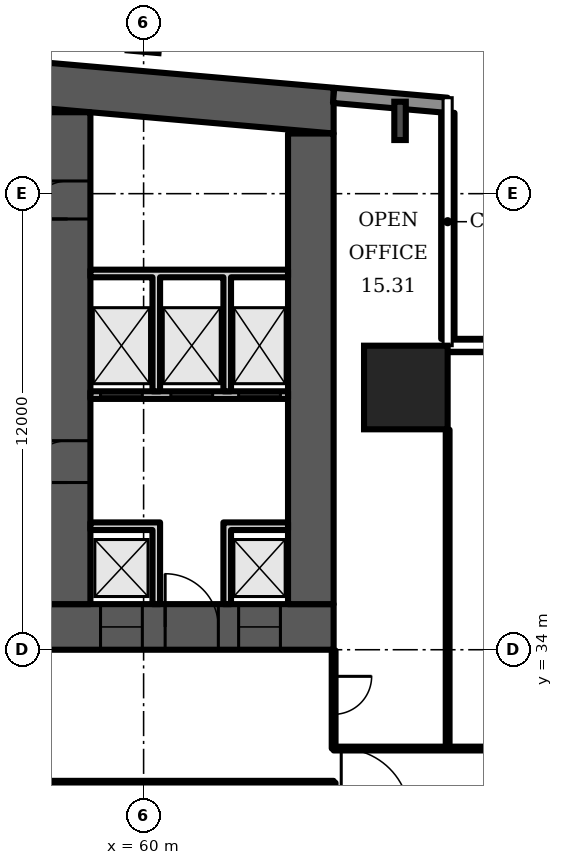
"""IFC4 building model, lengths in metres.
Left out: names, types, materials, properties, quantities, classifications, styles, units other than length and angle.
Written with IfcOpenShell. Run it as: python <this file> out.ifc"""

import sys

from ifc_helpers import new_model, si_unit, direction, frame, frame_2d, origin, origin_2d, place, context, subcontext, project, spatial, polyline, rectangle, i_section, outline, extrude, element, fill, save


model = new_model("IFC4")
c1 = context("Model", 3, precision=1e-05, world=origin(), true_north=direction((0.0, 1.0)))
c2 = subcontext(c1, "Body", "Model", "MODEL_VIEW")
j1 = project(units=[si_unit("LENGTHUNIT", "METRE"), si_unit("PLANEANGLEUNIT", "RADIAN")], contexts=[c1])
p1 = place(None, origin())
s1 = spatial("IfcSite", under=j1, at=p1, CompositionType="ELEMENT")
p2 = place(p1, origin())
s2 = spatial("IfcBuilding", under=s1, at=p2, CompositionType="ELEMENT")
p3 = place(p2, frame((0.0, 0.0, 73.9)))
s3 = spatial("IfcBuildingStorey", under=s2, at=p3, CompositionType="ELEMENT", Elevation=73.9)
p4 = place(p3, origin())
e1 = element("IfcWall", 1, at=p4, inside=s3, PredefinedType="SHEAR", context=c2, shape_type="SweptSolid", body=[
    extrude(outline(polyline([(9.0, 47.583), (37.0, 50.032), (65.0, 47.583), (65.0, 48.787), (37.0, 51.237), (9.0, 48.787), (9.0, 47.583)])), origin(), (0.0, 0.0, 1.0), 3.6),
])
p5 = place(p3, frame((9.0, 34.6, 0.0), z_axis=(0.0, 0.0, 1.0), x_axis=(1.0, 0.0, 0.0)))
e2 = element("IfcWall", 2, at=p5, inside=s3, PredefinedType="SHEAR", context=c2, shape_type="SweptSolid", body=[
    extrude(rectangle(XDim=56.0, YDim=1.2, at=frame_2d((28.0, 0.0))), origin(), (0.0, 0.0, 1.0), 3.6),
])
p6 = place(p5, frame((2.0, 0.0, 0.0)))
e3 = element("IfcOpeningElement", 3, at=p6, cuts=e2, PredefinedType="OPENING", context=c2, shape_type="SweptSolid", body=[
    extrude(rectangle(XDim=1.0, YDim=2.1, at=frame_2d((0.5, 1.05))), frame((0.0, 0.61, 0.0), z_axis=(0.0, -1.0, 0.0), x_axis=(1.0, 0.0, 0.0)), (0.0, 0.0, 1.0), 1.22),
])
p7 = place(p5, frame((4.6, 0.0, 0.0)))
e4 = element("IfcOpeningElement", 4, at=p7, cuts=e2, PredefinedType="OPENING", context=c2, shape_type="SweptSolid", body=[
    extrude(rectangle(XDim=1.0, YDim=2.1, at=frame_2d((0.5, 1.05))), frame((0.0, 0.61, 0.0), z_axis=(0.0, -1.0, 0.0), x_axis=(1.0, 0.0, 0.0)), (0.0, 0.0, 1.0), 1.22),
])
p8 = place(p5, frame((7.867, 0.0, 0.0)))
e5 = element("IfcOpeningElement", 5, at=p8, cuts=e2, PredefinedType="OPENING", context=c2, shape_type="SweptSolid", body=[
    extrude(rectangle(XDim=1.1, YDim=2.1, at=frame_2d((0.55, 1.05))), frame((0.0, 0.61, 0.0), z_axis=(0.0, -1.0, 0.0), x_axis=(1.0, 0.0, 0.0)), (0.0, 0.0, 1.0), 1.22),
])
p9 = place(p5, frame((12.033, 0.0, 0.0)))
e6 = element("IfcOpeningElement", 6, at=p9, cuts=e2, PredefinedType="OPENING", context=c2, shape_type="SweptSolid", body=[
    extrude(rectangle(XDim=1.1, YDim=2.1, at=frame_2d((0.55, 1.05))), frame((0.0, 0.61, 0.0), z_axis=(0.0, -1.0, 0.0), x_axis=(1.0, 0.0, 0.0)), (0.0, 0.0, 1.0), 1.22),
])
p10 = place(p5, frame((9.8, 0.0, 0.0)))
e7 = element("IfcOpeningElement", 7, at=p10, cuts=e2, PredefinedType="OPENING", context=c2, shape_type="SweptSolid", body=[
    extrude(rectangle(XDim=1.4, YDim=2.1, at=frame_2d((0.7, 1.05))), frame((0.0, 0.61, 0.0), z_axis=(0.0, -1.0, 0.0), x_axis=(1.0, 0.0, 0.0)), (0.0, 0.0, 1.0), 1.22),
])
p11 = place(p5, frame((14.65, 0.0, 0.0)))
e8 = element("IfcOpeningElement", 8, at=p11, cuts=e2, PredefinedType="OPENING", context=c2, shape_type="SweptSolid", body=[
    extrude(rectangle(XDim=1.2, YDim=2.1, at=frame_2d((0.6, 1.05))), frame((0.0, 0.61, 0.0), z_axis=(0.0, -1.0, 0.0), x_axis=(1.0, 0.0, 0.0)), (0.0, 0.0, 1.0), 1.22),
])
p12 = place(p5, frame((21.867, 0.0, 0.0)))
e9 = element("IfcOpeningElement", 9, at=p12, cuts=e2, PredefinedType="OPENING", context=c2, shape_type="SweptSolid", body=[
    extrude(rectangle(XDim=1.1, YDim=2.1, at=frame_2d((0.55, 1.05))), frame((0.0, 0.61, 0.0), z_axis=(0.0, -1.0, 0.0), x_axis=(1.0, 0.0, 0.0)), (0.0, 0.0, 1.0), 1.22),
])
p13 = place(p5, frame((26.033, 0.0, 0.0)))
e10 = element("IfcOpeningElement", 10, at=p13, cuts=e2, PredefinedType="OPENING", context=c2, shape_type="SweptSolid", body=[
    extrude(rectangle(XDim=1.1, YDim=2.1, at=frame_2d((0.55, 1.05))), frame((0.0, 0.61, 0.0), z_axis=(0.0, -1.0, 0.0), x_axis=(1.0, 0.0, 0.0)), (0.0, 0.0, 1.0), 1.22),
])
p14 = place(p5, frame((23.8, 0.0, 0.0)))
e11 = element("IfcOpeningElement", 11, at=p14, cuts=e2, PredefinedType="OPENING", context=c2, shape_type="SweptSolid", body=[
    extrude(rectangle(XDim=1.4, YDim=2.1, at=frame_2d((0.7, 1.05))), frame((0.0, 0.61, 0.0), z_axis=(0.0, -1.0, 0.0), x_axis=(1.0, 0.0, 0.0)), (0.0, 0.0, 1.0), 1.22),
])
p15 = place(p5, frame((28.867, 0.0, 0.0)))
e12 = element("IfcOpeningElement", 12, at=p15, cuts=e2, PredefinedType="OPENING", context=c2, shape_type="SweptSolid", body=[
    extrude(rectangle(XDim=1.1, YDim=2.1, at=frame_2d((0.55, 1.05))), frame((0.0, 0.61, 0.0), z_axis=(0.0, -1.0, 0.0), x_axis=(1.0, 0.0, 0.0)), (0.0, 0.0, 1.0), 1.22),
])
p16 = place(p5, frame((33.033, 0.0, 0.0)))
e13 = element("IfcOpeningElement", 13, at=p16, cuts=e2, PredefinedType="OPENING", context=c2, shape_type="SweptSolid", body=[
    extrude(rectangle(XDim=1.1, YDim=2.1, at=frame_2d((0.55, 1.05))), frame((0.0, 0.61, 0.0), z_axis=(0.0, -1.0, 0.0), x_axis=(1.0, 0.0, 0.0)), (0.0, 0.0, 1.0), 1.22),
])
p17 = place(p5, frame((40.15, 0.0, 0.0)))
e14 = element("IfcOpeningElement", 14, at=p17, cuts=e2, PredefinedType="OPENING", context=c2, shape_type="SweptSolid", body=[
    extrude(rectangle(XDim=1.2, YDim=2.1, at=frame_2d((0.6, 1.05))), frame((0.0, 0.61, 0.0), z_axis=(0.0, -1.0, 0.0), x_axis=(1.0, 0.0, 0.0)), (0.0, 0.0, 1.0), 1.22),
])
p18 = place(p5, frame((44.8, 0.0, 0.0)))
e15 = element("IfcOpeningElement", 15, at=p18, cuts=e2, PredefinedType="OPENING", context=c2, shape_type="SweptSolid", body=[
    extrude(rectangle(XDim=1.4, YDim=2.1, at=frame_2d((0.7, 1.05))), frame((0.0, 0.61, 0.0), z_axis=(0.0, -1.0, 0.0), x_axis=(1.0, 0.0, 0.0)), (0.0, 0.0, 1.0), 1.22),
])
p19 = place(p5, frame((49.867, 0.0, 0.0)))
e16 = element("IfcOpeningElement", 16, at=p19, cuts=e2, PredefinedType="OPENING", context=c2, shape_type="SweptSolid", body=[
    extrude(rectangle(XDim=1.1, YDim=2.1, at=frame_2d((0.55, 1.05))), frame((0.0, 0.61, 0.0), z_axis=(0.0, -1.0, 0.0), x_axis=(1.0, 0.0, 0.0)), (0.0, 0.0, 1.0), 1.22),
])
p20 = place(p5, frame((53.5, 0.0, 0.0)))
e17 = element("IfcOpeningElement", 17, at=p20, cuts=e2, PredefinedType="OPENING", context=c2, shape_type="SweptSolid", body=[
    extrude(rectangle(XDim=1.1, YDim=2.1, at=frame_2d((0.55, 1.05))), frame((0.0, 0.61, 0.0), z_axis=(0.0, -1.0, 0.0), x_axis=(1.0, 0.0, 0.0)), (0.0, 0.0, 1.0), 1.22),
])
p21 = place(p5, frame((51.567, 0.0, 0.0)))
e18 = element("IfcOpeningElement", 18, at=p21, cuts=e2, PredefinedType="OPENING", context=c2, shape_type="SweptSolid", body=[
    extrude(rectangle(XDim=1.4, YDim=2.1, at=frame_2d((0.7, 1.05))), frame((0.0, 0.61, 0.0), z_axis=(0.0, -1.0, 0.0), x_axis=(1.0, 0.0, 0.0)), (0.0, 0.0, 1.0), 1.22),
])
p22 = place(p3, frame((58.0, 35.2, 0.0), z_axis=(0.0, 0.0, 1.0), x_axis=(0.0, 1.0, 0.0)))
e19 = element("IfcWall", 19, at=p22, inside=s3, PredefinedType="SHEAR", context=c2, shape_type="SweptSolid", body=[
    extrude(rectangle(XDim=12.943, YDim=1.2, at=frame_2d((6.471, 0.0))), origin(), (0.0, 0.0, 1.0), 3.6),
])
p23 = place(p22, frame((10.134, 0.0, 0.0)))
e20 = element("IfcOpeningElement", 20, at=p23, cuts=e19, PredefinedType="OPENING", context=c2, shape_type="SweptSolid", body=[
    extrude(rectangle(XDim=1.0, YDim=2.1, at=frame_2d((0.5, 1.05))), frame((0.0, 0.61, 0.0), z_axis=(0.0, -1.0, 0.0), x_axis=(1.0, 0.0, 0.0)), (0.0, 0.0, 1.0), 1.22),
])
p24 = place(p22, frame((3.2, 0.0, 0.0)))
e21 = element("IfcOpeningElement", 21, at=p24, cuts=e19, PredefinedType="OPENING", context=c2, shape_type="SweptSolid", body=[
    extrude(rectangle(XDim=1.1, YDim=2.1, at=frame_2d((0.55, 1.05))), frame((0.0, 0.61, 0.0), z_axis=(0.0, -1.0, 0.0), x_axis=(1.0, 0.0, 0.0)), (0.0, 0.0, 1.0), 1.22),
])
p25 = place(p3, frame((64.4, 35.2, 0.0), z_axis=(0.0, 0.0, 1.0), x_axis=(0.0, 1.0, 0.0)))
e22 = element("IfcWall", 22, at=p25, inside=s3, PredefinedType="SHEAR", context=c2, shape_type="SweptSolid", body=[
    extrude(rectangle(XDim=12.383, YDim=1.2, at=frame_2d((6.191, 0.0))), origin(), (0.0, 0.0, 1.0), 3.6),
])
p26 = place(p3, frame((66.9, 40.9, 0.0), z_axis=(0.0, 0.0, 1.0), x_axis=(1.0, 0.0, 0.0)))
e23 = element("IfcColumn", 23, at=p26, inside=s3, PredefinedType="COLUMN", context=c2, shape_type="SweptSolid", body=[
    extrude(rectangle(XDim=2.2, YDim=2.2, at=origin_2d()), origin(), (0.0, 0.0, 1.0), 3.6),
])
p27 = place(p3, frame((66.748, 47.915, 0.0), z_axis=(0.0, 0.0, 1.0), x_axis=(1.0, 0.0, 0.0)))
e24 = element("IfcColumn", 24, at=p27, inside=s3, PredefinedType="COLUMN", context=c2, shape_type="SweptSolid", body=[
    extrude(i_section(OverallWidth=0.302, OverallDepth=1.008, WebThickness=0.021, FlangeThickness=0.04, FilletRadius=0.03, at=origin_2d()), origin(), (0.0, 0.0, 1.0), 3.6),
])
p28 = place(p3, frame((60.0, 49.885, 0.0), z_axis=(0.0, 0.0, 1.0), x_axis=(0.087156, 0.996197, 0.0)))
e25 = element("IfcColumn", 25, at=p28, inside=s3, PredefinedType="COLUMN", context=c2, shape_type="SweptSolid", body=[
    extrude(i_section(OverallWidth=0.303, OverallDepth=0.814, WebThickness=0.021, FlangeThickness=0.04, FilletRadius=0.03, at=origin_2d()), origin(), (0.0, 0.0, 1.0), 3.6),
])
p29 = place(p3, frame((67.983, 48.326, 0.0), z_axis=(0.0, 0.0, 1.0), x_axis=(-0.996194, 0.087168, 0.0)))
e26 = element("IfcWall", 26, at=p29, inside=s3, PredefinedType="SOLIDWALL", context=c2, shape_type="SweptSolid", body=[
    extrude(rectangle(XDim=2.994, YDim=0.4, at=frame_2d((1.497, 0.0))), origin(), (0.0, 0.0, 1.0), 3.2),
])
p30 = place(p3, frame((76.047, 42.005, 0.0), z_axis=(0.0, 0.0, 1.0), x_axis=(-1.0, 0.0, 0.0)))
e27 = element("IfcWall", 27, at=p30, inside=s3, PredefinedType="SOLIDWALL", context=c2, shape_type="SweptSolid", body=[
    extrude(rectangle(XDim=8.047, YDim=0.35, at=frame_2d((4.023, 0.0))), origin(), (0.0, 0.0, 1.0), 1.0),
])
p31 = place(p3, frame((68.005, 42.18, 0.0), z_axis=(0.0, 0.0, 1.0), x_axis=(0.0, 1.0, 0.0)))
e28 = element("IfcWall", 28, at=p31, inside=s3, PredefinedType="SOLIDWALL", context=c2, shape_type="SweptSolid", body=[
    extrude(rectangle(XDim=5.947, YDim=0.35, at=frame_2d((2.973, 0.0))), origin(), (0.0, 0.0, 1.0), 1.0),
])
p32 = place(p3, frame((58.6, 40.7, 0.0), z_axis=(0.0, 0.0, 1.0), x_axis=(1.0, 0.0, 0.0)))
e29 = element("IfcWall", 29, at=p32, inside=s3, PredefinedType="PARTITIONING", context=c2, shape_type="SweptSolid", body=[
    extrude(rectangle(XDim=5.2, YDim=0.2, at=frame_2d((2.6, 0.0))), origin(), (0.0, 0.0, 1.0), 3.2),
])
p33 = place(p32, frame((0.267, 0.0, 0.0)))
e30 = element("IfcOpeningElement", 30, at=p33, cuts=e29, PredefinedType="OPENING", context=c2, shape_type="SweptSolid", body=[
    extrude(rectangle(XDim=1.1, YDim=2.1, at=frame_2d((0.55, 1.05))), frame((0.0, 0.11, 0.0), z_axis=(0.0, -1.0, 0.0), x_axis=(1.0, 0.0, 0.0)), (0.0, 0.0, 1.0), 0.22),
])
p34 = place(p32, frame((2.117, 0.0, 0.0)))
e31 = element("IfcOpeningElement", 31, at=p34, cuts=e29, PredefinedType="OPENING", context=c2, shape_type="SweptSolid", body=[
    extrude(rectangle(XDim=1.1, YDim=2.1, at=frame_2d((0.55, 1.05))), frame((0.0, 0.11, 0.0), z_axis=(0.0, -1.0, 0.0), x_axis=(1.0, 0.0, 0.0)), (0.0, 0.0, 1.0), 0.22),
])
p35 = place(p32, frame((3.9, 0.0, 0.0)))
e32 = element("IfcOpeningElement", 32, at=p35, cuts=e29, PredefinedType="OPENING", context=c2, shape_type="SweptSolid", body=[
    extrude(rectangle(XDim=1.1, YDim=2.1, at=frame_2d((0.55, 1.05))), frame((0.0, 0.11, 0.0), z_axis=(0.0, -1.0, 0.0), x_axis=(1.0, 0.0, 0.0)), (0.0, 0.0, 1.0), 0.22),
])
p36 = place(p3, origin())
e33 = element("IfcWall", 33, at=p36, inside=s3, PredefinedType="PARTITIONING", context=c2, shape_type="SweptSolid", body=[
    extrude(outline(polyline([(60.233, 37.15), (58.6, 37.15), (58.6, 37.35), (60.233, 37.35), (60.433, 37.35), (60.433, 35.2), (60.233, 35.2), (60.233, 37.15)])), origin(), (0.0, 0.0, 1.0), 3.2),
])
p37 = place(p3, origin())
e34 = element("IfcWall", 34, at=p37, inside=s3, PredefinedType="PARTITIONING", context=c2, shape_type="SweptSolid", body=[
    extrude(outline(polyline([(62.1, 37.35), (62.3, 37.35), (63.8, 37.35), (63.8, 37.15), (62.3, 37.15), (62.3, 35.2), (62.1, 35.2), (62.1, 37.35)])), origin(), (0.0, 0.0, 1.0), 3.2),
])
p38 = place(p3, origin())
e35 = element("IfcWall", 35, at=p38, inside=s3, PredefinedType="PARTITIONING", context=c2, shape_type="SweptSolid", body=[
    extrude(outline(polyline([(60.433, 40.8), (60.233, 40.8), (60.233, 43.8), (58.6, 43.8), (58.6, 44.0), (63.8, 44.0), (63.8, 43.8), (62.3, 43.8), (62.3, 40.8), (62.1, 40.8), (62.1, 43.8), (60.433, 43.8), (60.433, 40.8)])), origin(), (0.0, 0.0, 1.0), 3.2),
])
p39 = place(p3, frame((45.3, 30.5, 0.0), z_axis=(0.0, 0.0, 1.0), x_axis=(1.0, 0.0, 0.0)))
e36 = element("IfcWall", 36, at=p39, inside=s3, PredefinedType="PARTITIONING", context=c2, shape_type="SweptSolid", body=[
    extrude(rectangle(XDim=19.7, YDim=0.1, at=frame_2d((9.85, 0.0))), origin(), (0.0, 0.0, 1.0), 3.2),
])
p40 = place(p3, frame((57.67, 13.24, 0.0), z_axis=(0.0, 0.0, 1.0), x_axis=(0.0, 1.0, 0.0)))
e37 = element("IfcWall", 37, at=p40, inside=s3, PredefinedType="PARTITIONING", context=c2, shape_type="SweptSolid", body=[
    extrude(rectangle(XDim=17.26, YDim=0.1, at=frame_2d((8.63, 0.0))), origin(), (0.0, 0.0, 1.0), 3.2),
])
p41 = place(p3, frame((65.0, 29.6, 0.0), z_axis=(0.0, 0.0, 1.0), x_axis=(0.0, 1.0, 0.0)))
e38 = element("IfcWall", 38, at=p41, inside=s3, PredefinedType="PARTITIONING", context=c2, shape_type="SweptSolid", body=[
    extrude(rectangle(XDim=0.9, YDim=0.1, at=frame_2d((0.45, 0.0))), origin(), (0.0, 0.0, 1.0), 3.2),
])
p42 = place(p3, frame((65.0, 31.4, 0.0), z_axis=(0.0, 0.0, 1.0), x_axis=(0.0, 1.0, 0.0)))
e39 = element("IfcWall", 39, at=p42, inside=s3, PredefinedType="PARTITIONING", context=c2, shape_type="SweptSolid", body=[
    extrude(rectangle(XDim=2.58, YDim=0.1, at=frame_2d((1.29, 0.0))), origin(), (0.0, 0.0, 1.0), 3.2),
])
p43 = place(p42, frame((0.9, 0.0, 0.0)))
e40 = element("IfcOpeningElement", 40, at=p43, cuts=e39, PredefinedType="OPENING", context=c2, shape_type="SweptSolid", body=[
    extrude(rectangle(XDim=1.0, YDim=2.1, at=frame_2d((0.5, 1.05))), frame((0.0, 0.06, 0.0), z_axis=(0.0, -1.0, 0.0), x_axis=(1.0, 0.0, 0.0)), (0.0, 0.0, 1.0), 0.12),
])
p44 = place(p3, frame((65.0, 31.4, 0.0), z_axis=(0.0, 0.0, 1.0), x_axis=(1.0, 0.0, 0.0)))
e41 = element("IfcWall", 41, at=p44, inside=s3, PredefinedType="PARTITIONING", context=c2, shape_type="SweptSolid", body=[
    extrude(rectangle(XDim=7.81, YDim=0.1, at=frame_2d((3.905, 0.0))), origin(), (0.0, 0.0, 1.0), 3.2),
])
p45 = place(p44, frame((6.657, 0.0, 0.0)))
e42 = element("IfcOpeningElement", 42, at=p45, cuts=e41, PredefinedType="OPENING", context=c2, shape_type="SweptSolid", body=[
    extrude(rectangle(XDim=1.0, YDim=2.1, at=frame_2d((0.5, 1.05))), frame((0.0, 0.06, 0.0), z_axis=(0.0, -1.0, 0.0), x_axis=(1.0, 0.0, 0.0)), (0.0, 0.0, 1.0), 0.12),
])
p46 = place(p3, frame((68.0, 31.4, 0.0), z_axis=(0.0, 0.0, 1.0), x_axis=(0.0, 1.0, 0.0)))
e43 = element("IfcWall", 43, at=p46, inside=s3, PredefinedType="PARTITIONING", context=c2, shape_type="SweptSolid", body=[
    extrude(rectangle(XDim=8.39, YDim=0.1, at=frame_2d((4.195, 0.0))), origin(), (0.0, 0.0, 1.0), 3.2),
])
p47 = place(p19, origin())
e44 = element("IfcDoor", 44, at=p47, inside=s3, OperationType="DOUBLE_DOOR_SLIDING", PredefinedType="DOOR", context=c2, shape_type="SweptSolid", body=[
    extrude(rectangle(XDim=1.1, YDim=2.1, at=frame_2d((0.55, 1.05))), frame((0.0, 0.025, 0.0), z_axis=(0.0, -1.0, 0.0), x_axis=(1.0, 0.0, 0.0)), (0.0, 0.0, 1.0), 0.05),
])
fill(e16, e44)
p48 = place(p20, origin())
e45 = element("IfcDoor", 45, at=p48, inside=s3, OperationType="DOUBLE_DOOR_SLIDING", PredefinedType="DOOR", context=c2, shape_type="SweptSolid", body=[
    extrude(rectangle(XDim=1.1, YDim=2.1, at=frame_2d((0.55, 1.05))), frame((0.0, 0.025, 0.0), z_axis=(0.0, -1.0, 0.0), x_axis=(1.0, 0.0, 0.0)), (0.0, 0.0, 1.0), 0.05),
])
fill(e17, e45)
p49 = place(p21, origin())
e46 = element("IfcDoor", 46, at=p49, inside=s3, OperationType="DOUBLE_DOOR_SINGLE_SWING", PredefinedType="DOOR", context=c2, shape_type="SweptSolid", body=[
    extrude(rectangle(XDim=1.4, YDim=2.1, at=frame_2d((0.7, 1.05))), frame((0.0, 0.025, 0.0), z_axis=(0.0, -1.0, 0.0), x_axis=(1.0, 0.0, 0.0)), (0.0, 0.0, 1.0), 0.05),
])
fill(e18, e46)
p50 = place(p33, origin())
e47 = element("IfcDoor", 47, at=p50, inside=s3, OperationType="DOUBLE_DOOR_SLIDING", PredefinedType="DOOR", context=c2, shape_type="SweptSolid", body=[
    extrude(rectangle(XDim=1.1, YDim=2.1, at=frame_2d((0.55, 1.05))), frame((0.0, 0.025, 0.0), z_axis=(0.0, -1.0, 0.0), x_axis=(1.0, 0.0, 0.0)), (0.0, 0.0, 1.0), 0.05),
])
fill(e30, e47)
p51 = place(p34, origin())
e48 = element("IfcDoor", 48, at=p51, inside=s3, OperationType="DOUBLE_DOOR_SLIDING", PredefinedType="DOOR", context=c2, shape_type="SweptSolid", body=[
    extrude(rectangle(XDim=1.1, YDim=2.1, at=frame_2d((0.55, 1.05))), frame((0.0, 0.025, 0.0), z_axis=(0.0, -1.0, 0.0), x_axis=(1.0, 0.0, 0.0)), (0.0, 0.0, 1.0), 0.05),
])
fill(e31, e48)
p52 = place(p35, origin())
e49 = element("IfcDoor", 49, at=p52, inside=s3, OperationType="DOUBLE_DOOR_SLIDING", PredefinedType="DOOR", context=c2, shape_type="SweptSolid", body=[
    extrude(rectangle(XDim=1.1, YDim=2.1, at=frame_2d((0.55, 1.05))), frame((0.0, 0.025, 0.0), z_axis=(0.0, -1.0, 0.0), x_axis=(1.0, 0.0, 0.0)), (0.0, 0.0, 1.0), 0.05),
])
fill(e32, e49)
p53 = place(p23, origin())
e50 = element("IfcDoor", 50, at=p53, inside=s3, OperationType="SINGLE_SWING_LEFT", PredefinedType="DOOR", context=c2, shape_type="SweptSolid", body=[
    extrude(rectangle(XDim=1.0, YDim=2.1, at=frame_2d((0.5, 1.05))), frame((0.0, 0.6, 0.0), z_axis=(0.0, -1.0, 0.0), x_axis=(1.0, 0.0, 0.0)), (0.0, 0.0, 1.0), 1.199),
])
fill(e20, e50)
p54 = place(p24, origin())
e51 = element("IfcDoor", 51, at=p54, inside=s3, OperationType="SINGLE_SWING_LEFT", PredefinedType="DOOR", context=c2, shape_type="SweptSolid", body=[
    extrude(rectangle(XDim=1.1, YDim=2.1, at=frame_2d((0.55, 1.05))), frame((0.0, 0.025, 0.0), z_axis=(0.0, -1.0, 0.0), x_axis=(1.0, 0.0, 0.0)), (0.0, 0.0, 1.0), 0.05),
])
fill(e21, e51)
p55 = place(p43, origin())
e52 = element("IfcDoor", 52, at=p55, inside=s3, OperationType="SINGLE_SWING_RIGHT", PredefinedType="DOOR", context=c2, shape_type="SweptSolid", body=[
    extrude(rectangle(XDim=1.0, YDim=2.1, at=frame_2d((0.5, 1.05))), frame((0.0, 0.025, 0.0), z_axis=(0.0, -1.0, 0.0), x_axis=(1.0, 0.0, 0.0)), (0.0, 0.0, 1.0), 0.05),
])
fill(e40, e52)
save(model, sys.argv[1])
